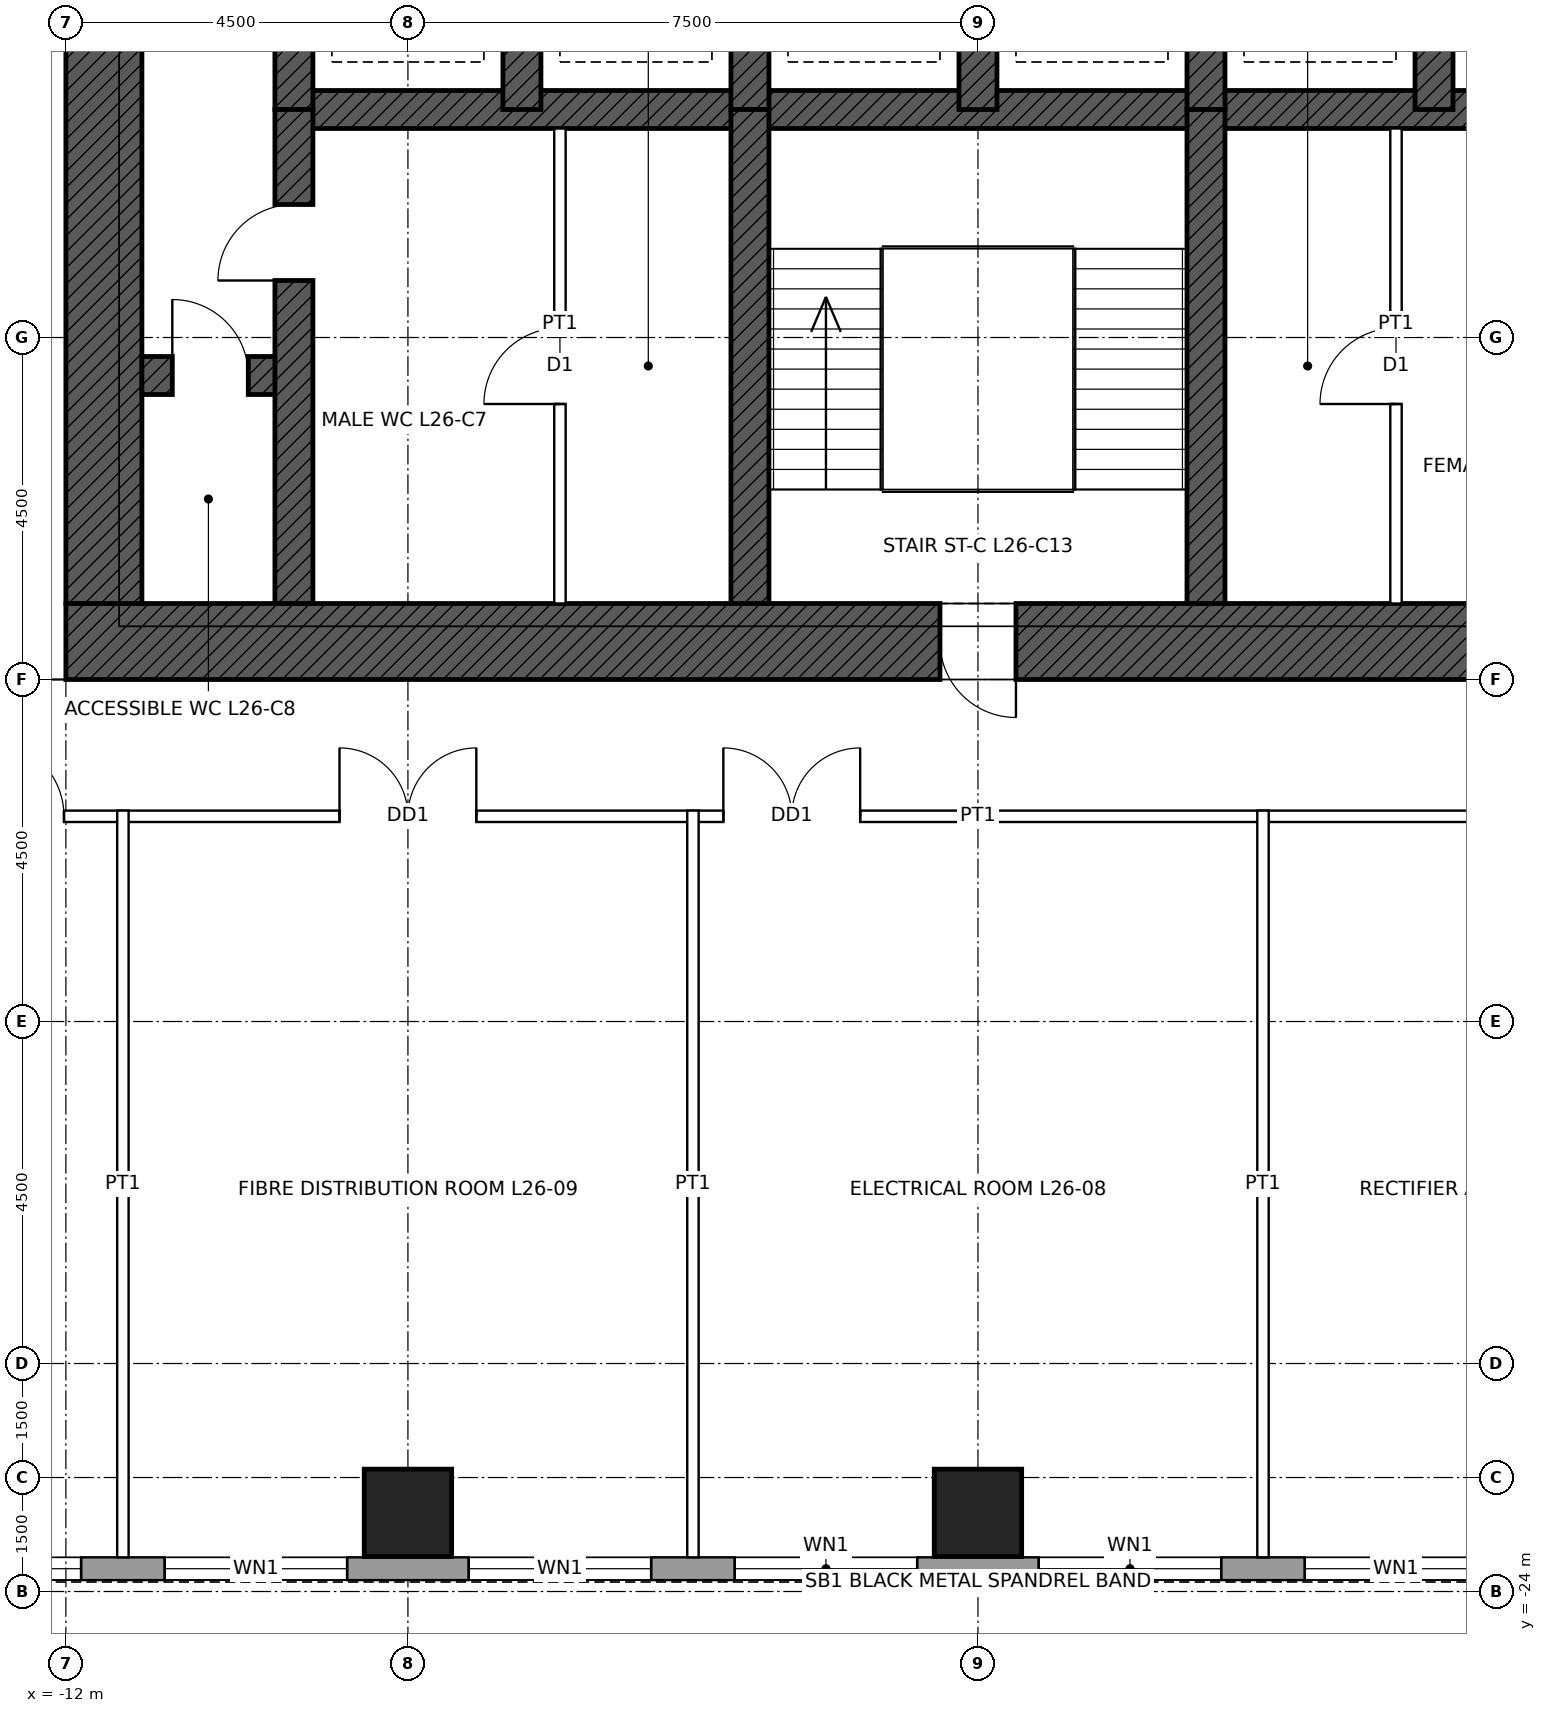
"""IFC4 building model, lengths in metres.
Left out: names, types, materials, properties, quantities, classifications, styles, units other than length and angle.
Written with IfcOpenShell. Run it as: python <this file> out.ifc"""

import sys

from ifc_helpers import new_model, si_unit, direction, frame, frame_2d, origin, origin_2d, place, context, subcontext, project, spatial, rectangle, hollow_rectangle, extrude, element, fill, save


model = new_model("IFC4")
c1 = context("Model", 3, precision=1e-05, world=origin(), true_north=direction((0.0, 1.0)))
c2 = subcontext(c1, "Body", "Model", "MODEL_VIEW")
j1 = project(units=[si_unit("LENGTHUNIT", "METRE"), si_unit("PLANEANGLEUNIT", "RADIAN")], contexts=[c1])
p1 = place(None, origin())
s1 = spatial("IfcSite", under=j1, at=p1, CompositionType="ELEMENT")
p2 = place(p1, origin())
s2 = spatial("IfcBuilding", under=s1, at=p2, CompositionType="ELEMENT")
p3 = place(p2, frame((0.0, 0.0, 131.4)))
s3 = spatial("IfcBuildingStorey", under=s2, at=p3, CompositionType="ELEMENT", Elevation=131.4)
for number, where, z_axis, x_axis in (
    (1, (0.0, -22.965, 0.0), (0.0, 0.0, 1.0), (1.0, 0.0, 0.0)),
    (2, (-7.5, -22.965, 0.0), (0.0, 0.0, 1.0), (1.0, 0.0, 0.0)),
):
    element("IfcColumn", number, at=place(p3, frame(where, z_axis=z_axis, x_axis=x_axis)), inside=s3, PredefinedType="COLUMN", context=c2, shape_type="SweptSolid", body=[
        extrude(hollow_rectangle(XDim=1.15, YDim=1.15, WallThickness=0.075, at=origin_2d()), origin(), (0.0, 0.0, 1.0), 4.5),
    ])
p4 = place(p3, frame((12.0, -11.5, 0.0), z_axis=(0.0, 0.0, 1.0), x_axis=(-1.0, 0.0, 0.0)))
e3 = element("IfcWall", 3, at=p4, inside=s3, PredefinedType="SHEAR", context=c2, shape_type="SweptSolid", body=[
    extrude(rectangle(XDim=24.0, YDim=1.0, at=frame_2d((12.0, 0.0))), origin(), (0.0, 0.0, 1.0), 4.5),
])
p5 = place(p4, frame((11.5, 0.0, 0.0)))
e4 = element("IfcOpeningElement", 4, at=p5, cuts=e3, PredefinedType="OPENING", context=c2, shape_type="SweptSolid", body=[
    extrude(rectangle(XDim=1.0, YDim=2.1, at=frame_2d((0.5, 1.05))), frame((0.0, 0.51, 0.0), z_axis=(0.0, -1.0, 0.0), x_axis=(1.0, 0.0, 0.0)), (0.0, 0.0, 1.0), 1.02),
])
p6 = place(p4, frame((1.0, 0.0, 0.0)))
e5 = element("IfcOpeningElement", 5, at=p6, cuts=e3, PredefinedType="OPENING", context=c2, shape_type="SweptSolid", body=[
    extrude(rectangle(XDim=1.0, YDim=2.4, at=frame_2d((0.5, 1.2))), frame((0.0, 0.51, 0.0), z_axis=(0.0, -1.0, 0.0), x_axis=(1.0, 0.0, 0.0)), (0.0, 0.0, 1.0), 1.02),
])
p7 = place(p3, frame((-11.5, -11.0, 0.0), z_axis=(0.0, 0.0, 1.0), x_axis=(0.0, 1.0, 0.0)))
e6 = element("IfcWall", 6, at=p7, inside=s3, PredefinedType="SHEAR", context=c2, shape_type="SweptSolid", body=[
    extrude(rectangle(XDim=22.0, YDim=1.0, at=frame_2d((11.0, 0.0))), origin(), (0.0, 0.0, 1.0), 4.5),
])
p8 = place(p7, frame((10.5, 0.0, 0.0)))
e7 = element("IfcOpeningElement", 7, at=p8, cuts=e6, PredefinedType="OPENING", context=c2, shape_type="SweptSolid", body=[
    extrude(rectangle(XDim=1.0, YDim=2.4, at=frame_2d((0.5, 1.2))), frame((0.0, 0.51, 0.0), z_axis=(0.0, -1.0, 0.0), x_axis=(1.0, 0.0, 0.0)), (0.0, 0.0, 1.0), 1.02),
])
p9 = place(p3, frame((-9.0, -4.5, 0.0), z_axis=(0.0, 0.0, 1.0), x_axis=(1.0, 0.0, 0.0)))
e8 = element("IfcWall", 8, at=p9, inside=s3, PredefinedType="SHEAR", context=c2, shape_type="SweptSolid", body=[
    extrude(rectangle(XDim=18.0, YDim=0.5, at=frame_2d((9.0, 0.0))), origin(), (0.0, 0.0, 1.0), 4.5),
])
p10 = place(p3, frame((-11.0, -8.0, 0.0), z_axis=(0.0, 0.0, 1.0), x_axis=(1.0, 0.0, 0.0)))
e9 = element("IfcWall", 9, at=p10, inside=s3, PredefinedType="SHEAR", context=c2, shape_type="SweptSolid", body=[
    extrude(rectangle(XDim=2.0, YDim=0.5, at=frame_2d((1.0, 0.0))), origin(), (0.0, 0.0, 1.0), 4.5),
])
p11 = place(p10, frame((0.4, 0.0, 0.0)))
e10 = element("IfcOpeningElement", 10, at=p11, cuts=e9, PredefinedType="OPENING", context=c2, shape_type="SweptSolid", body=[
    extrude(rectangle(XDim=1.0, YDim=2.1, at=frame_2d((0.5, 1.05))), frame((0.0, 0.26, 0.0), z_axis=(0.0, -1.0, 0.0), x_axis=(1.0, 0.0, 0.0)), (0.0, 0.0, 1.0), 0.52),
])
for number, where, z_axis, x_axis in (
    (11, (-9.0, -4.5, 0.0), (0.0, 0.0, 1.0), (0.0, 1.0, 0.0)),
    (12, (-6.0, -4.5, 0.0), (0.0, 0.0, 1.0), (0.0, 1.0, 0.0)),
    (13, (-3.0, -4.5, 0.0), (0.0, 0.0, 1.0), (0.0, 1.0, 0.0)),
    (14, (0.0, -4.5, 0.0), (0.0, 0.0, 1.0), (0.0, 1.0, 0.0)),
    (15, (3.0, -4.5, 0.0), (0.0, 0.0, 1.0), (0.0, 1.0, 0.0)),
    (16, (6.0, -4.5, 0.0), (0.0, 0.0, 1.0), (0.0, 1.0, 0.0)),
):
    element("IfcWall", number, at=place(p3, frame(where, z_axis=z_axis, x_axis=x_axis)), inside=s3, PredefinedType="SHEAR", context=c2, shape_type="SweptSolid", body=[
        extrude(rectangle(XDim=3.0, YDim=0.5, at=frame_2d((1.5, 0.0))), origin(), (0.0, 0.0, 1.0), 4.5),
    ])
p12 = place(p3, frame((-9.0, -11.0, 0.0), z_axis=(0.0, 0.0, 1.0), x_axis=(0.0, 1.0, 0.0)))
e17 = element("IfcWall", 17, at=p12, inside=s3, PredefinedType="SHEAR", context=c2, shape_type="SweptSolid", body=[
    extrude(rectangle(XDim=6.5, YDim=0.5, at=frame_2d((3.25, 0.0))), origin(), (0.0, 0.0, 1.0), 4.5),
])
p13 = place(p12, frame((4.25, 0.0, 0.0)))
e18 = element("IfcOpeningElement", 18, at=p13, cuts=e17, PredefinedType="OPENING", context=c2, shape_type="SweptSolid", body=[
    extrude(rectangle(XDim=1.0, YDim=2.1, at=frame_2d((0.5, 1.05))), frame((0.0, 0.26, 0.0), z_axis=(0.0, -1.0, 0.0), x_axis=(1.0, 0.0, 0.0)), (0.0, 0.0, 1.0), 0.52),
])
for number, where, z_axis, x_axis in (
    (19, (-3.0, -11.0, 0.0), (0.0, 0.0, 1.0), (0.0, 1.0, 0.0)),
    (20, (3.0, -11.0, 0.0), (0.0, 0.0, 1.0), (0.0, 1.0, 0.0)),
):
    element("IfcWall", number, at=place(p3, frame(where, z_axis=z_axis, x_axis=x_axis)), inside=s3, PredefinedType="SHEAR", context=c2, shape_type="SweptSolid", body=[
        extrude(rectangle(XDim=6.5, YDim=0.5, at=frame_2d((3.25, 0.0))), origin(), (0.0, 0.0, 1.0), 4.5),
    ])
p14 = place(p3, frame((16.2, -23.7, 0.0), z_axis=(0.0, 0.0, 1.0), x_axis=(-1.0, 0.0, 0.0)))
e21 = element("IfcWall", 21, at=p14, inside=s3, PredefinedType="SOLIDWALL", context=c2, shape_type="SweptSolid", body=[
    extrude(rectangle(XDim=32.4, YDim=0.3, at=frame_2d((16.2, 0.0))), origin(), (0.0, 0.0, 1.0), 4.3),
])
p15 = place(p14, frame((2.0, 0.0, 1.0)))
e22 = element("IfcOpeningElement", 22, at=p15, cuts=e21, PredefinedType="OPENING", context=c2, shape_type="SweptSolid", body=[
    extrude(rectangle(XDim=2.4, YDim=1.2, at=frame_2d((1.2, 0.6))), frame((0.0, 0.16, 0.0), z_axis=(0.0, -1.0, 0.0), x_axis=(1.0, 0.0, 0.0)), (0.0, 0.0, 1.0), 0.32),
])
p16 = place(p14, frame((5.5, 0.0, 1.0)))
e23 = element("IfcOpeningElement", 23, at=p16, cuts=e21, PredefinedType="OPENING", context=c2, shape_type="SweptSolid", body=[
    extrude(rectangle(XDim=2.4, YDim=1.2, at=frame_2d((1.2, 0.6))), frame((0.0, 0.16, 0.0), z_axis=(0.0, -1.0, 0.0), x_axis=(1.0, 0.0, 0.0)), (0.0, 0.0, 1.0), 0.32),
])
p17 = place(p14, frame((9.5, 0.0, 1.0)))
e24 = element("IfcOpeningElement", 24, at=p17, cuts=e21, PredefinedType="OPENING", context=c2, shape_type="SweptSolid", body=[
    extrude(rectangle(XDim=2.4, YDim=1.2, at=frame_2d((1.2, 0.6))), frame((0.0, 0.16, 0.0), z_axis=(0.0, -1.0, 0.0), x_axis=(1.0, 0.0, 0.0)), (0.0, 0.0, 1.0), 0.32),
])
p18 = place(p14, frame((13.0, 0.0, 1.0)))
e25 = element("IfcOpeningElement", 25, at=p18, cuts=e21, PredefinedType="OPENING", context=c2, shape_type="SweptSolid", body=[
    extrude(rectangle(XDim=2.4, YDim=1.2, at=frame_2d((1.2, 0.6))), frame((0.0, 0.16, 0.0), z_axis=(0.0, -1.0, 0.0), x_axis=(1.0, 0.0, 0.0)), (0.0, 0.0, 1.0), 0.32),
])
p19 = place(p14, frame((17.0, 0.0, 1.0)))
e26 = element("IfcOpeningElement", 26, at=p19, cuts=e21, PredefinedType="OPENING", context=c2, shape_type="SweptSolid", body=[
    extrude(rectangle(XDim=2.4, YDim=1.2, at=frame_2d((1.2, 0.6))), frame((0.0, 0.16, 0.0), z_axis=(0.0, -1.0, 0.0), x_axis=(1.0, 0.0, 0.0)), (0.0, 0.0, 1.0), 0.32),
])
p20 = place(p14, frame((20.5, 0.0, 1.0)))
e27 = element("IfcOpeningElement", 27, at=p20, cuts=e21, PredefinedType="OPENING", context=c2, shape_type="SweptSolid", body=[
    extrude(rectangle(XDim=2.4, YDim=1.2, at=frame_2d((1.2, 0.6))), frame((0.0, 0.16, 0.0), z_axis=(0.0, -1.0, 0.0), x_axis=(1.0, 0.0, 0.0)), (0.0, 0.0, 1.0), 0.32),
])
p21 = place(p14, frame((24.5, 0.0, 1.0)))
e28 = element("IfcOpeningElement", 28, at=p21, cuts=e21, PredefinedType="OPENING", context=c2, shape_type="SweptSolid", body=[
    extrude(rectangle(XDim=2.4, YDim=1.2, at=frame_2d((1.2, 0.6))), frame((0.0, 0.16, 0.0), z_axis=(0.0, -1.0, 0.0), x_axis=(1.0, 0.0, 0.0)), (0.0, 0.0, 1.0), 0.32),
])
p22 = place(p14, frame((28.0, 0.0, 1.0)))
e29 = element("IfcOpeningElement", 29, at=p22, cuts=e21, PredefinedType="OPENING", context=c2, shape_type="SweptSolid", body=[
    extrude(rectangle(XDim=2.4, YDim=1.2, at=frame_2d((1.2, 0.6))), frame((0.0, 0.16, 0.0), z_axis=(0.0, -1.0, 0.0), x_axis=(1.0, 0.0, 0.0)), (0.0, 0.0, 1.0), 0.32),
])
p23 = place(p3, frame((-13.875, -13.8, 0.0), z_axis=(0.0, 0.0, 1.0), x_axis=(1.0, 0.0, 0.0)))
e30 = element("IfcWall", 30, at=p23, inside=s3, PredefinedType="PARTITIONING", context=c2, shape_type="SweptSolid", body=[
    extrude(rectangle(XDim=27.75, YDim=0.15, at=frame_2d((13.875, 0.0))), origin(), (0.0, 0.0, 1.0), 4.3),
])
p24 = place(p23, frame((20.475, 0.0, 0.0)))
e31 = element("IfcOpeningElement", 31, at=p24, cuts=e30, PredefinedType="OPENING", context=c2, shape_type="SweptSolid", body=[
    extrude(rectangle(XDim=1.8, YDim=2.4, at=frame_2d((0.9, 1.2))), frame((0.0, 0.085, 0.0), z_axis=(0.0, -1.0, 0.0), x_axis=(1.0, 0.0, 0.0)), (0.0, 0.0, 1.0), 0.17),
])
p25 = place(p23, frame((10.525, 0.0, 0.0)))
e32 = element("IfcOpeningElement", 32, at=p25, cuts=e30, PredefinedType="OPENING", context=c2, shape_type="SweptSolid", body=[
    extrude(rectangle(XDim=1.8, YDim=2.4, at=frame_2d((0.9, 1.2))), frame((0.0, 0.085, 0.0), z_axis=(0.0, -1.0, 0.0), x_axis=(1.0, 0.0, 0.0)), (0.0, 0.0, 1.0), 0.17),
])
p26 = place(p23, frame((5.475, 0.0, 0.0)))
e33 = element("IfcOpeningElement", 33, at=p26, cuts=e30, PredefinedType="OPENING", context=c2, shape_type="SweptSolid", body=[
    extrude(rectangle(XDim=1.8, YDim=2.4, at=frame_2d((0.9, 1.2))), frame((0.0, 0.085, 0.0), z_axis=(0.0, -1.0, 0.0), x_axis=(1.0, 0.0, 0.0)), (0.0, 0.0, 1.0), 0.17),
])
p27 = place(p23, frame((25.9, 0.0, 0.0)))
e34 = element("IfcOpeningElement", 34, at=p27, cuts=e30, PredefinedType="OPENING", context=c2, shape_type="SweptSolid", body=[
    extrude(rectangle(XDim=1.0, YDim=2.1, at=frame_2d((0.5, 1.05))), frame((0.0, 0.085, 0.0), z_axis=(0.0, -1.0, 0.0), x_axis=(1.0, 0.0, 0.0)), (0.0, 0.0, 1.0), 0.17),
])
p28 = place(p23, frame((0.85, 0.0, 0.0)))
e35 = element("IfcOpeningElement", 35, at=p28, cuts=e30, PredefinedType="OPENING", context=c2, shape_type="SweptSolid", body=[
    extrude(rectangle(XDim=1.0, YDim=2.1, at=frame_2d((0.5, 1.05))), frame((0.0, 0.085, 0.0), z_axis=(0.0, -1.0, 0.0), x_axis=(1.0, 0.0, 0.0)), (0.0, 0.0, 1.0), 0.17),
])
for number, where, z_axis, x_axis in (
    (36, (-11.25, -23.55, 0.0), (0.0, 0.0, 1.0), (0.0, 1.0, 0.0)),
    (37, (-3.75, -23.55, 0.0), (0.0, 0.0, 1.0), (0.0, 1.0, 0.0)),
    (38, (3.75, -23.55, 0.0), (0.0, 0.0, 1.0), (0.0, 1.0, 0.0)),
):
    element("IfcWall", number, at=place(p3, frame(where, z_axis=z_axis, x_axis=x_axis)), inside=s3, PredefinedType="PARTITIONING", context=c2, shape_type="SweptSolid", body=[
        extrude(rectangle(XDim=9.825, YDim=0.15, at=frame_2d((4.913, 0.0))), origin(), (0.0, 0.0, 1.0), 3.431),
    ])
p29 = place(p3, frame((-5.5, -11.0, 0.0), z_axis=(0.0, 0.0, 1.0), x_axis=(0.0, 1.0, 0.0)))
e39 = element("IfcWall", 39, at=p29, inside=s3, PredefinedType="PARTITIONING", context=c2, shape_type="SweptSolid", body=[
    extrude(rectangle(XDim=6.25, YDim=0.15, at=frame_2d((3.125, 0.0))), origin(), (0.0, 0.0, 1.0), 4.25),
])
p30 = place(p29, frame((2.625, 0.0, 0.0)))
e40 = element("IfcOpeningElement", 40, at=p30, cuts=e39, PredefinedType="OPENING", context=c2, shape_type="SweptSolid", body=[
    extrude(rectangle(XDim=1.0, YDim=2.1, at=frame_2d((0.5, 1.05))), frame((0.0, 0.085, 0.0), z_axis=(0.0, -1.0, 0.0), x_axis=(1.0, 0.0, 0.0)), (0.0, 0.0, 1.0), 0.17),
])
p31 = place(p3, frame((5.5, -11.0, 0.0), z_axis=(0.0, 0.0, 1.0), x_axis=(0.0, 1.0, 0.0)))
e41 = element("IfcWall", 41, at=p31, inside=s3, PredefinedType="PARTITIONING", context=c2, shape_type="SweptSolid", body=[
    extrude(rectangle(XDim=6.25, YDim=0.15, at=frame_2d((3.125, 0.0))), origin(), (0.0, 0.0, 1.0), 4.25),
])
p32 = place(p31, frame((2.625, 0.0, 0.0)))
e42 = element("IfcOpeningElement", 42, at=p32, cuts=e41, PredefinedType="OPENING", context=c2, shape_type="SweptSolid", body=[
    extrude(rectangle(XDim=1.0, YDim=2.1, at=frame_2d((0.5, 1.05))), frame((0.0, 0.085, 0.0), z_axis=(0.0, -1.0, 0.0), x_axis=(1.0, 0.0, 0.0)), (0.0, 0.0, 1.0), 0.17),
])
p33 = place(p17, origin())
e43 = element("IfcWindow", 43, at=p33, inside=s3, PartitioningType="SINGLE_PANEL", PredefinedType="WINDOW", context=c2, shape_type="SweptSolid", body=[
    extrude(rectangle(XDim=2.4, YDim=1.2, at=frame_2d((1.2, 0.6))), frame((0.0, 0.03, 0.0), z_axis=(0.0, -1.0, 0.0), x_axis=(1.0, 0.0, 0.0)), (0.0, 0.0, 1.0), 0.06),
])
fill(e24, e43)
p34 = place(p18, origin())
e44 = element("IfcWindow", 44, at=p34, inside=s3, PartitioningType="SINGLE_PANEL", PredefinedType="WINDOW", context=c2, shape_type="SweptSolid", body=[
    extrude(rectangle(XDim=2.4, YDim=1.2, at=frame_2d((1.2, 0.6))), frame((0.0, 0.03, 0.0), z_axis=(0.0, -1.0, 0.0), x_axis=(1.0, 0.0, 0.0)), (0.0, 0.0, 1.0), 0.06),
])
fill(e25, e44)
p35 = place(p19, origin())
e45 = element("IfcWindow", 45, at=p35, inside=s3, PartitioningType="SINGLE_PANEL", PredefinedType="WINDOW", context=c2, shape_type="SweptSolid", body=[
    extrude(rectangle(XDim=2.4, YDim=1.2, at=frame_2d((1.2, 0.6))), frame((0.0, 0.03, 0.0), z_axis=(0.0, -1.0, 0.0), x_axis=(1.0, 0.0, 0.0)), (0.0, 0.0, 1.0), 0.06),
])
fill(e26, e45)
p36 = place(p20, origin())
e46 = element("IfcWindow", 46, at=p36, inside=s3, PartitioningType="SINGLE_PANEL", PredefinedType="WINDOW", context=c2, shape_type="SweptSolid", body=[
    extrude(rectangle(XDim=2.4, YDim=1.2, at=frame_2d((1.2, 0.6))), frame((0.0, 0.03, 0.0), z_axis=(0.0, -1.0, 0.0), x_axis=(1.0, 0.0, 0.0)), (0.0, 0.0, 1.0), 0.06),
])
fill(e27, e46)
p37 = place(p21, origin())
e47 = element("IfcWindow", 47, at=p37, inside=s3, PartitioningType="SINGLE_PANEL", PredefinedType="WINDOW", context=c2, shape_type="SweptSolid", body=[
    extrude(rectangle(XDim=2.4, YDim=1.2, at=frame_2d((1.2, 0.6))), frame((0.0, 0.03, 0.0), z_axis=(0.0, -1.0, 0.0), x_axis=(1.0, 0.0, 0.0)), (0.0, 0.0, 1.0), 0.06),
])
fill(e28, e47)
p38 = place(p22, origin())
e48 = element("IfcWindow", 48, at=p38, inside=s3, PartitioningType="SINGLE_PANEL", PredefinedType="WINDOW", context=c2, shape_type="SweptSolid", body=[
    extrude(rectangle(XDim=2.4, YDim=1.2, at=frame_2d((1.2, 0.6))), frame((0.0, 0.03, 0.0), z_axis=(0.0, -1.0, 0.0), x_axis=(1.0, 0.0, 0.0)), (0.0, 0.0, 1.0), 0.06),
])
fill(e29, e48)
p39 = place(p5, origin())
e49 = element("IfcDoor", 49, at=p39, inside=s3, OperationType="SINGLE_SWING_LEFT", PredefinedType="DOOR", context=c2, shape_type="SweptSolid", body=[
    extrude(rectangle(XDim=1.0, YDim=2.1, at=frame_2d((0.5, 1.05))), frame((0.0, 0.485, 0.0), z_axis=(0.0, -1.0, 0.0), x_axis=(1.0, 0.0, 0.0)), (0.0, 0.0, 1.0), 0.05),
])
fill(e4, e49)
p40 = place(p13, origin())
e50 = element("IfcDoor", 50, at=p40, inside=s3, OperationType="SINGLE_SWING_LEFT", PredefinedType="DOOR", context=c2, shape_type="SweptSolid", body=[
    extrude(rectangle(XDim=1.0, YDim=2.1, at=frame_2d((0.5, 1.05))), frame((0.0, 0.025, 0.0), z_axis=(0.0, -1.0, 0.0), x_axis=(1.0, 0.0, 0.0)), (0.0, 0.0, 1.0), 0.05),
])
fill(e18, e50)
p41 = place(p11, origin())
e51 = element("IfcDoor", 51, at=p41, inside=s3, OperationType="SINGLE_SWING_LEFT", PredefinedType="DOOR", context=c2, shape_type="SweptSolid", body=[
    extrude(rectangle(XDim=1.0, YDim=2.1, at=frame_2d((0.5, 1.05))), frame((0.0, 0.025, 0.0), z_axis=(0.0, -1.0, 0.0), x_axis=(1.0, 0.0, 0.0)), (0.0, 0.0, 1.0), 0.05),
])
fill(e10, e51)
p42 = place(p30, origin())
e52 = element("IfcDoor", 52, at=p42, inside=s3, OperationType="SINGLE_SWING_LEFT", PredefinedType="DOOR", context=c2, shape_type="SweptSolid", body=[
    extrude(rectangle(XDim=1.0, YDim=2.1, at=frame_2d((0.5, 1.05))), frame((0.0, 0.025, 0.0), z_axis=(0.0, -1.0, 0.0), x_axis=(1.0, 0.0, 0.0)), (0.0, 0.0, 1.0), 0.05),
])
fill(e40, e52)
p43 = place(p32, origin())
e53 = element("IfcDoor", 53, at=p43, inside=s3, OperationType="SINGLE_SWING_LEFT", PredefinedType="DOOR", context=c2, shape_type="SweptSolid", body=[
    extrude(rectangle(XDim=1.0, YDim=2.1, at=frame_2d((0.5, 1.05))), frame((0.0, 0.025, 0.0), z_axis=(0.0, -1.0, 0.0), x_axis=(1.0, 0.0, 0.0)), (0.0, 0.0, 1.0), 0.05),
])
fill(e42, e53)
p44 = place(p25, origin())
e54 = element("IfcDoor", 54, at=p44, inside=s3, OperationType="DOUBLE_DOOR_SINGLE_SWING", PredefinedType="DOOR", context=c2, shape_type="SweptSolid", body=[
    extrude(rectangle(XDim=1.8, YDim=2.4, at=frame_2d((0.9, 1.2))), frame((0.0, 0.025, 0.0), z_axis=(0.0, -1.0, 0.0), x_axis=(1.0, 0.0, 0.0)), (0.0, 0.0, 1.0), 0.05),
])
fill(e32, e54)
p45 = place(p26, origin())
e55 = element("IfcDoor", 55, at=p45, inside=s3, OperationType="DOUBLE_DOOR_SINGLE_SWING", PredefinedType="DOOR", context=c2, shape_type="SweptSolid", body=[
    extrude(rectangle(XDim=1.8, YDim=2.4, at=frame_2d((0.9, 1.2))), frame((0.0, 0.025, 0.0), z_axis=(0.0, -1.0, 0.0), x_axis=(1.0, 0.0, 0.0)), (0.0, 0.0, 1.0), 0.05),
])
fill(e33, e55)
p46 = place(p28, origin())
e56 = element("IfcDoor", 56, at=p46, inside=s3, OperationType="SINGLE_SWING_LEFT", PredefinedType="DOOR", context=c2, shape_type="SweptSolid", body=[
    extrude(rectangle(XDim=1.0, YDim=2.1, at=frame_2d((0.5, 1.05))), frame((0.0, 0.025, 0.0), z_axis=(0.0, -1.0, 0.0), x_axis=(1.0, 0.0, 0.0)), (0.0, 0.0, 1.0), 0.05),
])
fill(e35, e56)
save(model, sys.argv[1])
